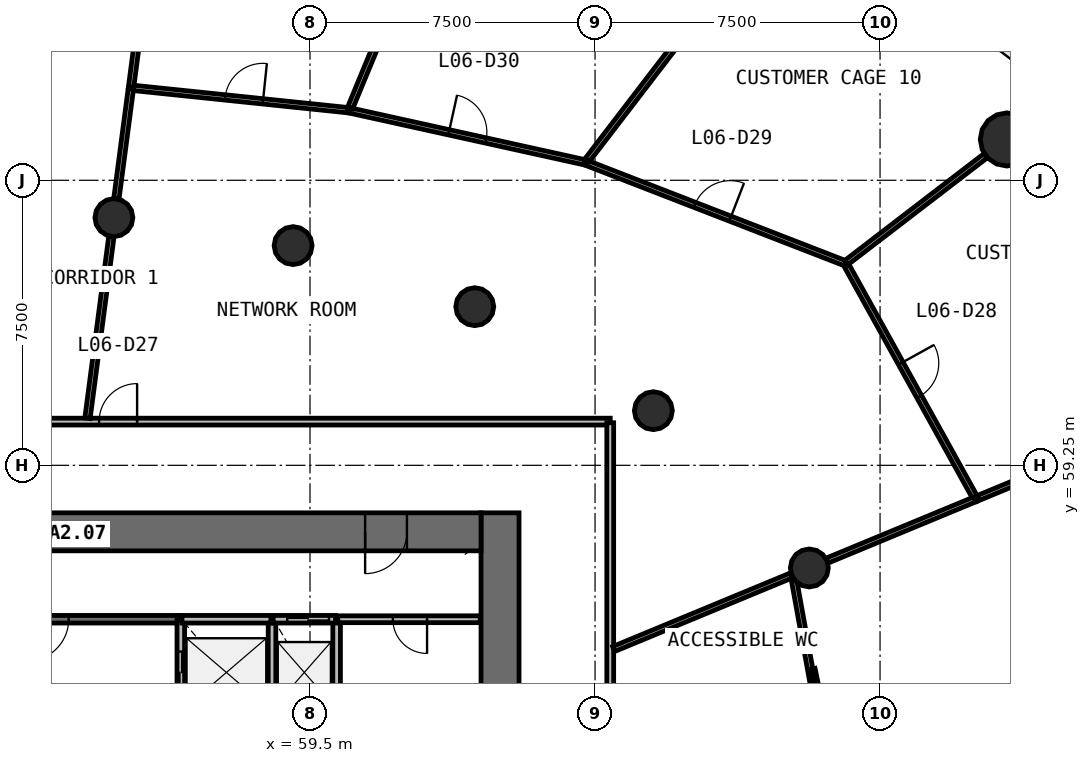
"""IFC4 building model, lengths in metres.
Left out: names, types, materials, properties, quantities, classifications, styles, units other than length and angle.
Written with IfcOpenShell. Run it as: python <this file> out.ifc"""

import sys

from ifc_helpers import new_model, si_unit, direction, frame, frame_2d, origin, origin_2d, place, context, subcontext, project, spatial, rectangle, circle, extrude, source, transform, mapped, element, fill, save


model = new_model("IFC4")
c1 = context("Model", 3, precision=1e-05, world=origin(), true_north=direction((0.0, 1.0)))
c2 = subcontext(c1, "Body", "Model", "MODEL_VIEW")
j1 = project(units=[si_unit("LENGTHUNIT", "METRE"), si_unit("PLANEANGLEUNIT", "RADIAN")], contexts=[c1])
p1 = place(None, origin())
s1 = spatial("IfcSite", under=j1, at=p1, CompositionType="ELEMENT")
p2 = place(p1, origin())
s2 = spatial("IfcBuilding", under=s1, at=p2, CompositionType="ELEMENT")
p3 = place(p2, frame((0.0, 0.0, 27.0)))
s3 = spatial("IfcBuildingStorey", under=s2, at=p3, CompositionType="ELEMENT", Elevation=27.0)
p4 = place(p3, frame((64.5, 38.0, 0.0), z_axis=(0.0, 0.0, 1.0), x_axis=(0.0, 1.0, 0.0)))
e1 = element("IfcWall", 1, at=p4, inside=s3, PredefinedType="SHEAR", context=c2, shape_type="SweptSolid", body=[
    extrude(rectangle(XDim=20.0, YDim=1.0, at=frame_2d((10.0, 0.0))), origin(), (0.0, 0.0, 1.0), 4.4),
])
p5 = place(p4, frame((9.1, 0.0, 0.0)))
e2 = element("IfcOpeningElement", 2, at=p5, cuts=e1, PredefinedType="OPENING", context=c2, shape_type="SweptSolid", body=[
    extrude(rectangle(XDim=1.8, YDim=2.1, at=frame_2d((0.9, 1.05))), frame((0.0, 0.51, 0.0), z_axis=(0.0, -1.0, 0.0), x_axis=(1.0, 0.0, 0.0)), (0.0, 0.0, 1.0), 1.02),
])
p6 = place(p3, frame((64.0, 57.5, 0.0), z_axis=(0.0, 0.0, 1.0), x_axis=(-1.0, 0.0, 0.0)))
e3 = element("IfcWall", 3, at=p6, inside=s3, PredefinedType="SHEAR", context=c2, shape_type="SweptSolid", body=[
    extrude(rectangle(XDim=24.0, YDim=1.0, at=frame_2d((12.0, 0.0))), origin(), (0.0, 0.0, 1.0), 4.4),
])
p7 = place(p6, frame((21.45, 0.0, 0.0)))
e4 = element("IfcOpeningElement", 4, at=p7, cuts=e3, PredefinedType="OPENING", context=c2, shape_type="SweptSolid", body=[
    extrude(rectangle(XDim=1.1, YDim=2.1, at=frame_2d((0.55, 1.05))), frame((0.0, 0.51, 0.0), z_axis=(0.0, -1.0, 0.0), x_axis=(1.0, 0.0, 0.0)), (0.0, 0.0, 1.0), 1.02),
])
p8 = place(p6, frame((1.95, 0.0, 0.0)))
e5 = element("IfcOpeningElement", 5, at=p8, cuts=e3, PredefinedType="OPENING", context=c2, shape_type="SweptSolid", body=[
    extrude(rectangle(XDim=1.1, YDim=2.1, at=frame_2d((0.55, 1.05))), frame((0.0, 0.51, 0.0), z_axis=(0.0, -1.0, 0.0), x_axis=(1.0, 0.0, 0.0)), (0.0, 0.0, 1.0), 1.02),
])
m1 = source(origin(), c2, "Body", "SweptSolid", [
    extrude(circle(Radius=0.7, at=origin_2d()), origin(), (0.0, 0.0, 1.0), 4.4),
])
p9 = place(p3, frame((77.836, 67.824, 0.0), z_axis=(0.0, 0.0, 1.0), x_axis=(1.0, 0.0, 0.0)))
e6 = element("IfcColumn", 6, at=p9, inside=s3, PredefinedType="COLUMN", context=c2, shape_type="MappedRepresentation", body=[
    mapped(m1, transform((0.0, 0.0, 0.0), scale=1.0)),
])
m2 = source(origin(), c2, "Body", "SweptSolid", [
    extrude(circle(Radius=0.5, at=origin_2d()), origin(), (0.0, 0.0, 1.0), 4.4),
])
for number, where, z_axis, x_axis in (
    (7, (72.639, 56.549, 0.0), (0.0, 0.0, 1.0), (1.0, 0.0, 0.0)),
    (8, (68.535, 60.688, 0.0), (0.0, 0.0, 1.0), (1.0, 0.0, 0.0)),
    (9, (63.835, 63.424, 0.0), (0.0, 0.0, 1.0), (1.0, 0.0, 0.0)),
    (10, (59.055, 65.031, 0.0), (0.0, 0.0, 1.0), (1.0, 0.0, 0.0)),
    (11, (54.339, 65.767, 0.0), (0.0, 0.0, 1.0), (1.0, 0.0, 0.0)),
):
    element("IfcColumn", number, at=place(p3, frame(where, z_axis=z_axis, x_axis=x_axis)), inside=s3, PredefinedType="COLUMN", context=c2, shape_type="MappedRepresentation", body=[
        mapped(m2, transform((0.0, 0.0, 0.0), scale=1.0)),
    ])
p10 = place(p3, frame((56.1, 55.2, 0.0), z_axis=(0.0, 0.0, 1.0), x_axis=(-1.0, 0.0, 0.0)))
e12 = element("IfcWall", 12, at=p10, inside=s3, PredefinedType="SOLIDWALL", context=c2, shape_type="SweptSolid", body=[
    extrude(rectangle(XDim=5.67, YDim=0.2, at=frame_2d((2.835, 0.0))), origin(), (0.0, 0.0, 1.0), 3.95),
])
p11 = place(p10, frame((2.95, 0.0, 0.0)))
e13 = element("IfcOpeningElement", 13, at=p11, cuts=e12, PredefinedType="OPENING", context=c2, shape_type="SweptSolid", body=[
    extrude(rectangle(XDim=1.1, YDim=2.1, at=frame_2d((0.55, 1.05))), frame((0.0, 0.11, 0.0), z_axis=(0.0, -1.0, 0.0), x_axis=(1.0, 0.0, 0.0)), (0.0, 0.0, 1.0), 0.22),
])
p12 = place(p3, frame((56.1, 55.17, 0.0), z_axis=(0.0, 0.0, 1.0), x_axis=(0.0, -1.0, 0.0)))
e14 = element("IfcWall", 14, at=p12, inside=s3, PredefinedType="SOLIDWALL", context=c2, shape_type="SweptSolid", body=[
    extrude(rectangle(XDim=2.77, YDim=0.2, at=frame_2d((1.385, 0.0))), origin(), (0.0, 0.0, 1.0), 3.95),
])
p13 = place(p12, frame((0.82, 0.0, 0.0)))
e15 = element("IfcOpeningElement", 15, at=p13, cuts=e14, PredefinedType="OPENING", context=c2, shape_type="SweptSolid", body=[
    extrude(rectangle(XDim=1.1, YDim=2.1, at=frame_2d((0.55, 1.05))), frame((0.0, 0.11, 0.0), z_axis=(0.0, -1.0, 0.0), x_axis=(1.0, 0.0, 0.0)), (0.0, 0.0, 1.0), 0.22),
])
for number, where, z_axis, x_axis in (
    (16, (58.5, 52.4, 0.0), (0.0, 0.0, 1.0), (0.0, 1.0, 0.0)),
    (17, (60.2, 52.4, 0.0), (0.0, 0.0, 1.0), (0.0, 1.0, 0.0)),
):
    element("IfcWall", number, at=place(p3, frame(where, z_axis=z_axis, x_axis=x_axis)), inside=s3, PredefinedType="SOLIDWALL", context=c2, shape_type="SweptSolid", body=[
        extrude(rectangle(XDim=2.8, YDim=0.2, at=frame_2d((1.4, 0.0))), origin(), (0.0, 0.0, 1.0), 3.95),
    ])
p14 = place(p3, frame((58.47, 55.2, 0.0), z_axis=(0.0, 0.0, 1.0), x_axis=(-1.0, 0.0, 0.0)))
e18 = element("IfcWall", 18, at=p14, inside=s3, PredefinedType="SOLIDWALL", context=c2, shape_type="SweptSolid", body=[
    extrude(rectangle(XDim=2.34, YDim=0.2, at=frame_2d((1.17, 0.0))), origin(), (0.0, 0.0, 1.0), 3.95),
])
p15 = place(p3, frame((60.17, 55.2, 0.0), z_axis=(0.0, 0.0, 1.0), x_axis=(-1.0, 0.0, 0.0)))
e19 = element("IfcWall", 19, at=p15, inside=s3, PredefinedType="SOLIDWALL", context=c2, shape_type="SweptSolid", body=[
    extrude(rectangle(XDim=1.64, YDim=0.2, at=frame_2d((0.82, 0.0))), origin(), (0.0, 0.0, 1.0), 3.95),
])
p16 = place(p15, frame((0.17, 0.0, 0.0)))
e20 = element("IfcOpeningElement", 20, at=p16, cuts=e19, PredefinedType="OPENING", context=c2, shape_type="SweptSolid", body=[
    extrude(rectangle(XDim=1.1, YDim=2.1, at=frame_2d((0.55, 1.05))), frame((0.0, 0.11, 0.0), z_axis=(0.0, -1.0, 0.0), x_axis=(1.0, 0.0, 0.0)), (0.0, 0.0, 1.0), 0.22),
])
p17 = place(p3, frame((36.6, 60.4, 0.0), z_axis=(0.0, 0.0, 1.0), x_axis=(1.0, 0.0, 0.0)))
e21 = element("IfcWall", 21, at=p17, inside=s3, PredefinedType="PARTITIONING", context=c2, shape_type="SweptSolid", body=[
    extrude(rectangle(XDim=30.8, YDim=0.18, at=frame_2d((15.4, 0.0))), origin(), (0.0, 0.0, 1.0), 3.05),
])
p18 = place(p17, frame((17.35, 0.0, 0.0)))
e22 = element("IfcOpeningElement", 22, at=p18, cuts=e21, PredefinedType="OPENING", context=c2, shape_type="SweptSolid", body=[
    extrude(rectangle(XDim=1.0, YDim=2.1, at=frame_2d((0.5, 1.05))), frame((0.0, 0.1, 0.0), z_axis=(0.0, -1.0, 0.0), x_axis=(1.0, 0.0, 0.0)), (0.0, 0.0, 1.0), 0.2),
])
p19 = place(p17, frame((14.95, 0.0, 0.0)))
e23 = element("IfcOpeningElement", 23, at=p19, cuts=e21, PredefinedType="OPENING", context=c2, shape_type="SweptSolid", body=[
    extrude(rectangle(XDim=1.0, YDim=2.1, at=frame_2d((0.5, 1.05))), frame((0.0, 0.1, 0.0), z_axis=(0.0, -1.0, 0.0), x_axis=(1.0, 0.0, 0.0)), (0.0, 0.0, 1.0), 0.2),
])
p20 = place(p17, frame((12.55, 0.0, 0.0)))
e24 = element("IfcOpeningElement", 24, at=p20, cuts=e21, PredefinedType="OPENING", context=c2, shape_type="SweptSolid", body=[
    extrude(rectangle(XDim=1.0, YDim=2.1, at=frame_2d((0.5, 1.05))), frame((0.0, 0.1, 0.0), z_axis=(0.0, -1.0, 0.0), x_axis=(1.0, 0.0, 0.0)), (0.0, 0.0, 1.0), 0.2),
])
p21 = place(p3, frame((67.4, 60.37, 0.0), z_axis=(0.0, 0.0, 1.0), x_axis=(0.0, -1.0, 0.0)))
e25 = element("IfcWall", 25, at=p21, inside=s3, PredefinedType="PARTITIONING", context=c2, shape_type="SweptSolid", body=[
    extrude(rectangle(XDim=23.583, YDim=0.18, at=frame_2d((11.791, 0.0))), origin(), (0.0, 0.0, 1.0), 3.05),
])
p22 = place(p21, frame((11.833, 0.0, 0.0)))
e26 = element("IfcOpeningElement", 26, at=p22, cuts=e25, PredefinedType="OPENING", context=c2, shape_type="SweptSolid", body=[
    extrude(rectangle(XDim=0.9, YDim=2.1, at=frame_2d((0.45, 1.05))), frame((0.0, 0.1, 0.0), z_axis=(0.0, -1.0, 0.0), x_axis=(1.0, 0.0, 0.0)), (0.0, 0.0, 1.0), 0.2),
])
p23 = place(p21, frame((10.433, 0.0, 0.0)))
e27 = element("IfcOpeningElement", 27, at=p23, cuts=e25, PredefinedType="OPENING", context=c2, shape_type="SweptSolid", body=[
    extrude(rectangle(XDim=0.9, YDim=2.1, at=frame_2d((0.45, 1.05))), frame((0.0, 0.1, 0.0), z_axis=(0.0, -1.0, 0.0), x_axis=(1.0, 0.0, 0.0)), (0.0, 0.0, 1.0), 0.2),
])
p24 = place(p21, frame((7.833, 0.0, 0.0)))
e28 = element("IfcOpeningElement", 28, at=p24, cuts=e25, PredefinedType="OPENING", context=c2, shape_type="SweptSolid", body=[
    extrude(rectangle(XDim=0.9, YDim=2.1, at=frame_2d((0.45, 1.05))), frame((0.0, 0.1, 0.0), z_axis=(0.0, -1.0, 0.0), x_axis=(1.0, 0.0, 0.0)), (0.0, 0.0, 1.0), 0.2),
])
p25 = place(p21, frame((19.133, 0.0, 0.0)))
e29 = element("IfcOpeningElement", 29, at=p25, cuts=e25, PredefinedType="OPENING", context=c2, shape_type="SweptSolid", body=[
    extrude(rectangle(XDim=1.0, YDim=2.1, at=frame_2d((0.5, 1.05))), frame((0.0, 0.1, 0.0), z_axis=(0.0, -1.0, 0.0), x_axis=(1.0, 0.0, 0.0)), (0.0, 0.0, 1.0), 0.2),
])
p26 = place(p21, frame((14.732, 0.0, 0.0)))
e30 = element("IfcOpeningElement", 30, at=p26, cuts=e25, PredefinedType="OPENING", context=c2, shape_type="SweptSolid", body=[
    extrude(rectangle(XDim=1.0, YDim=2.1, at=frame_2d((0.5, 1.05))), frame((0.0, 0.1, 0.0), z_axis=(0.0, -1.0, 0.0), x_axis=(1.0, 0.0, 0.0)), (0.0, 0.0, 1.0), 0.2),
])
p27 = place(p3, frame((63.98, 55.2, 0.0), z_axis=(0.0, 0.0, 1.0), x_axis=(-1.0, 0.0, 0.0)))
e31 = element("IfcWall", 31, at=p27, inside=s3, PredefinedType="PARTITIONING", context=c2, shape_type="SweptSolid", body=[
    extrude(rectangle(XDim=3.75, YDim=0.18, at=frame_2d((1.875, 0.0))), origin(), (0.0, 0.0, 1.0), 3.95),
])
p28 = place(p27, frame((1.4, 0.0, 0.0)))
e32 = element("IfcOpeningElement", 32, at=p28, cuts=e31, PredefinedType="OPENING", context=c2, shape_type="SweptSolid", body=[
    extrude(rectangle(XDim=0.9, YDim=2.1, at=frame_2d((0.45, 1.05))), frame((0.0, 0.1, 0.0), z_axis=(0.0, -1.0, 0.0), x_axis=(1.0, 0.0, 0.0)), (0.0, 0.0, 1.0), 0.2),
])
p29 = place(p3, frame((66.747, 67.219, 0.0), z_axis=(0.0, 0.0, 1.0), x_axis=(0.932284149261, -0.361726782305, 0.0)))
e33 = element("IfcWall", 33, at=p29, inside=s3, PredefinedType="PARTITIONING", context=c2, shape_type="SweptSolid", body=[
    extrude(rectangle(XDim=7.337, YDim=0.14, at=frame_2d((3.668, 0.0))), origin(), (0.0, 0.0, 1.0), 3.05),
])
p30 = place(p29, frame((3.087, 0.0, 0.0)))
e34 = element("IfcOpeningElement", 34, at=p30, cuts=e33, PredefinedType="OPENING", context=c2, shape_type="SweptSolid", body=[
    extrude(rectangle(XDim=1.0, YDim=2.1, at=frame_2d((0.5, 1.05))), frame((0.0, 0.08, 0.0), z_axis=(0.0, -1.0, 0.0), x_axis=(1.0, 0.0, 0.0)), (0.0, 0.0, 1.0), 0.16),
])
p31 = place(p3, frame((77.021, 58.364, 0.0), z_axis=(0.0, 0.0, 1.0), x_axis=(0.923882643146, 0.382675922542, 0.0)))
e35 = element("IfcWall", 35, at=p31, inside=s3, PredefinedType="PARTITIONING", context=c2, shape_type="SweptSolid", body=[
    extrude(rectangle(XDim=7.118, YDim=0.14, at=frame_2d((3.559, 0.0))), origin(), (0.0, 0.0, 1.0), 3.05),
])
p32 = place(p3, frame((73.602, 64.539, 0.0), z_axis=(0.0, 0.0, 1.0), x_axis=(0.484486331766, -0.874798830779, 0.0)))
e36 = element("IfcWall", 36, at=p32, inside=s3, PredefinedType="PARTITIONING", context=c2, shape_type="SweptSolid", body=[
    extrude(rectangle(XDim=7.028, YDim=0.14, at=frame_2d((3.514, 0.0))), origin(), (0.0, 0.0, 1.0), 3.05),
])
p33 = place(p32, frame((2.978, 0.0, 0.0)))
e37 = element("IfcOpeningElement", 37, at=p33, cuts=e36, PredefinedType="OPENING", context=c2, shape_type="SweptSolid", body=[
    extrude(rectangle(XDim=1.0, YDim=2.1, at=frame_2d((0.5, 1.05))), frame((0.0, 0.08, 0.0), z_axis=(0.0, -1.0, 0.0), x_axis=(1.0, 0.0, 0.0)), (0.0, 0.0, 1.0), 0.16),
])
p34 = place(p3, frame((60.529, 68.591, 0.0), z_axis=(0.0, 0.0, 1.0), x_axis=(0.976496953748, -0.21553120266, 0.0)))
e38 = element("IfcWall", 38, at=p34, inside=s3, PredefinedType="PARTITIONING", context=c2, shape_type="SweptSolid", body=[
    extrude(rectangle(XDim=6.338, YDim=0.14, at=frame_2d((3.169, 0.0))), origin(), (0.0, 0.0, 1.0), 3.05),
])
p35 = place(p34, frame((2.688, 0.0, 0.0)))
e39 = element("IfcOpeningElement", 39, at=p35, cuts=e38, PredefinedType="OPENING", context=c2, shape_type="SweptSolid", body=[
    extrude(rectangle(XDim=1.0, YDim=2.1, at=frame_2d((0.5, 1.05))), frame((0.0, 0.08, 0.0), z_axis=(0.0, -1.0, 0.0), x_axis=(1.0, 0.0, 0.0)), (0.0, 0.0, 1.0), 0.16),
])
p36 = place(p3, frame((54.789, 69.187, 0.0), z_axis=(0.0, 0.0, 1.0), x_axis=(0.130536559076, 0.991443496496, 0.0)))
e40 = element("IfcWall", 40, at=p36, inside=s3, PredefinedType="PARTITIONING", context=c2, shape_type="SweptSolid", body=[
    extrude(rectangle(XDim=5.927, YDim=0.14, at=frame_2d((2.963, 0.0))), origin(), (0.0, 0.0, 1.0), 3.05),
])
p37 = place(p3, frame((60.556, 68.657, 0.0), z_axis=(0.0, 0.0, 1.0), x_axis=(0.382663574121, 0.923887757815, 0.0)))
e41 = element("IfcWall", 41, at=p37, inside=s3, PredefinedType="PARTITIONING", context=c2, shape_type="SweptSolid", body=[
    extrude(rectangle(XDim=5.74, YDim=0.14, at=frame_2d((2.87, 0.0))), origin(), (0.0, 0.0, 1.0), 3.05),
])
p38 = place(p3, frame((54.859, 69.18, 0.0), z_axis=(0.0, 0.0, 1.0), x_axis=(0.994651908079, -0.103283985953, 0.0)))
e42 = element("IfcWall", 42, at=p38, inside=s3, PredefinedType="PARTITIONING", context=c2, shape_type="SweptSolid", body=[
    extrude(rectangle(XDim=5.671, YDim=0.14, at=frame_2d((2.835, 0.0))), origin(), (0.0, 0.0, 1.0), 3.05),
])
p39 = place(p38, frame((2.421, 0.0, 0.0)))
e43 = element("IfcOpeningElement", 43, at=p39, cuts=e42, PredefinedType="OPENING", context=c2, shape_type="SweptSolid", body=[
    extrude(rectangle(XDim=1.0, YDim=2.1, at=frame_2d((0.5, 1.05))), frame((0.0, 0.08, 0.0), z_axis=(0.0, -1.0, 0.0), x_axis=(1.0, 0.0, 0.0)), (0.0, 0.0, 1.0), 0.16),
])
p40 = place(p3, frame((73.215, 50.823, 0.0), z_axis=(0.0, 0.0, 1.0), x_axis=(-0.178121903576, 0.984008428555, 0.0)))
e44 = element("IfcWall", 44, at=p40, inside=s3, PredefinedType="PARTITIONING", context=c2, shape_type="SweptSolid", body=[
    extrude(rectangle(XDim=5.515, YDim=0.14, at=frame_2d((2.758, 0.0))), origin(), (0.0, 0.0, 1.0), 3.05),
])
p41 = place(p3, frame((66.792, 67.277, 0.0), z_axis=(0.0, 0.0, 1.0), x_axis=(0.608764273517, 0.793351157615, 0.0)))
e45 = element("IfcWall", 45, at=p41, inside=s3, PredefinedType="PARTITIONING", context=c2, shape_type="SweptSolid", body=[
    extrude(rectangle(XDim=5.375, YDim=0.14, at=frame_2d((2.688, 0.0))), origin(), (0.0, 0.0, 1.0), 3.05),
])
p42 = place(p3, frame((67.49, 54.416, 0.0), z_axis=(0.0, 0.0, 1.0), x_axis=(0.923890025086, 0.382658100067, 0.0)))
e46 = element("IfcWall", 46, at=p42, inside=s3, PredefinedType="PARTITIONING", context=c2, shape_type="SweptSolid", body=[
    extrude(rectangle(XDim=5.068, YDim=0.14, at=frame_2d((2.534, 0.0))), origin(), (0.0, 0.0, 1.0), 3.05),
])
p43 = place(p3, frame((53.644, 60.49, 0.0), z_axis=(0.0, 0.0, 1.0), x_axis=(0.130523979823, 0.991445152639, 0.0)))
e47 = element("IfcWall", 47, at=p43, inside=s3, PredefinedType="PARTITIONING", context=c2, shape_type="SweptSolid", body=[
    extrude(rectangle(XDim=4.818, YDim=0.14, at=frame_2d((2.409, 0.0))), origin(), (0.0, 0.0, 1.0), 3.05),
])
p44 = place(p3, frame((73.611, 64.583, 0.0), z_axis=(0.0, 0.0, 1.0), x_axis=(0.793369862055, 0.608739896821, 0.0)))
e48 = element("IfcWall", 48, at=p44, inside=s3, PredefinedType="PARTITIONING", context=c2, shape_type="SweptSolid", body=[
    extrude(rectangle(XDim=4.62, YDim=0.14, at=frame_2d((2.31, 0.0))), origin(), (0.0, 0.0, 1.0), 3.05),
])
p45 = place(p3, frame((73.106, 56.742, 0.0), z_axis=(0.0, 0.0, 1.0), x_axis=(0.923866219986, 0.382715570063, 0.0)))
e49 = element("IfcWall", 49, at=p45, inside=s3, PredefinedType="PARTITIONING", context=c2, shape_type="SweptSolid", body=[
    extrude(rectangle(XDim=4.208, YDim=0.14, at=frame_2d((2.104, 0.0))), origin(), (0.0, 0.0, 1.0), 3.05),
])
p46 = place(p3, frame((54.405, 66.267, 0.0), z_axis=(0.0, 0.0, 1.0), x_axis=(0.130484843212, 0.991450304197, 0.0)))
e50 = element("IfcWall", 50, at=p46, inside=s3, PredefinedType="PARTITIONING", context=c2, shape_type="SweptSolid", body=[
    extrude(rectangle(XDim=2.915, YDim=0.14, at=frame_2d((1.458, 0.0))), origin(), (0.0, 0.0, 1.0), 3.05),
])
p47 = place(p3, frame((72.99, 52.654, 0.0), z_axis=(0.0, 0.0, 1.0), x_axis=(-0.205214844297, 0.978716949726, 0.0)))
e51 = element("IfcWall", 51, at=p47, inside=s3, PredefinedType="PARTITIONING", context=c2, shape_type="SweptSolid", body=[
    extrude(rectangle(XDim=1.268, YDim=0.12, at=frame_2d((0.634, 0.0))), origin(), (0.0, 0.0, 1.0), 3.05),
])
m3 = source(origin(), c2, "Body", "SweptSolid", [
    extrude(rectangle(XDim=1.1, YDim=2.1, at=frame_2d((0.55, 1.05))), frame((0.0, 0.025, 0.0), z_axis=(0.0, -1.0, 0.0), x_axis=(1.0, 0.0, 0.0)), (0.0, 0.0, 1.0), 0.05),
])
p48 = place(p13, origin())
e52 = element("IfcDoor", 52, at=p48, inside=s3, OperationType="DOUBLE_DOOR_SLIDING", PredefinedType="USERDEFINED", context=c2, shape_type="MappedRepresentation", body=[
    mapped(m3, transform((0.0, 0.0, 0.0), scale=1.0)),
])
fill(e15, e52)
p49 = place(p16, origin())
e53 = element("IfcDoor", 53, at=p49, inside=s3, OperationType="DOUBLE_DOOR_SLIDING", PredefinedType="USERDEFINED", context=c2, shape_type="MappedRepresentation", body=[
    mapped(m3, transform((0.0, 0.0, 0.0), scale=1.0)),
])
fill(e20, e53)
m4 = source(origin(), c2, "Body", "SweptSolid", [
    extrude(rectangle(XDim=1.1, YDim=2.1, at=frame_2d((0.55, 1.05))), frame((0.0, 0.025, 0.0), z_axis=(0.0, -1.0, 0.0), x_axis=(1.0, 0.0, 0.0)), (0.0, 0.0, 1.0), 0.05),
])
p50 = place(p11, origin())
e54 = element("IfcDoor", 54, at=p50, inside=s3, OperationType="SINGLE_SWING_RIGHT", PredefinedType="DOOR", context=c2, shape_type="MappedRepresentation", body=[
    mapped(m4, transform((0.0, 0.0, 0.0), scale=1.0)),
])
fill(e13, e54)
m5 = source(origin(), c2, "Body", "SweptSolid", [
    extrude(rectangle(XDim=1.1, YDim=2.1, at=frame_2d((0.55, 1.05))), frame((0.0, 0.025, 0.0), z_axis=(0.0, -1.0, 0.0), x_axis=(1.0, 0.0, 0.0)), (0.0, 0.0, 1.0), 0.05),
])
p51 = place(p8, origin())
e55 = element("IfcDoor", 55, at=p51, inside=s3, OperationType="SINGLE_SWING_RIGHT", PredefinedType="DOOR", context=c2, shape_type="MappedRepresentation", body=[
    mapped(m5, transform((0.0, 0.0, 0.0), scale=1.0)),
])
fill(e5, e55)
m6 = source(origin(), c2, "Body", "SweptSolid", [
    extrude(rectangle(XDim=1.0, YDim=2.1, at=frame_2d((0.5, 1.05))), frame((0.0, 0.025, 0.0), z_axis=(0.0, -1.0, 0.0), x_axis=(1.0, 0.0, 0.0)), (0.0, 0.0, 1.0), 0.05),
])
p52 = place(p18, origin())
e56 = element("IfcDoor", 56, at=p52, inside=s3, OperationType="SINGLE_SWING_RIGHT", PredefinedType="DOOR", context=c2, shape_type="MappedRepresentation", body=[
    mapped(m6, transform((0.0, 0.0, 0.0), scale=1.0)),
])
fill(e22, e56)
p53 = place(p33, origin())
e57 = element("IfcDoor", 57, at=p53, inside=s3, OperationType="SINGLE_SWING_LEFT", PredefinedType="DOOR", context=c2, shape_type="MappedRepresentation", body=[
    mapped(m6, transform((0.0, 0.0, 0.0), scale=1.0)),
])
fill(e37, e57)
p54 = place(p30, origin())
e58 = element("IfcDoor", 58, at=p54, inside=s3, OperationType="SINGLE_SWING_RIGHT", PredefinedType="DOOR", context=c2, shape_type="MappedRepresentation", body=[
    mapped(m6, transform((0.0, 0.0, 0.0), scale=1.0)),
])
fill(e34, e58)
p55 = place(p35, origin())
e59 = element("IfcDoor", 59, at=p55, inside=s3, OperationType="SINGLE_SWING_LEFT", PredefinedType="DOOR", context=c2, shape_type="MappedRepresentation", body=[
    mapped(m6, transform((0.0, 0.0, 0.0), scale=1.0)),
])
fill(e39, e59)
p56 = place(p39, origin())
e60 = element("IfcDoor", 60, at=p56, inside=s3, OperationType="SINGLE_SWING_RIGHT", PredefinedType="DOOR", context=c2, shape_type="MappedRepresentation", body=[
    mapped(m6, transform((0.0, 0.0, 0.0), scale=1.0)),
])
fill(e43, e60)
m7 = source(origin(), c2, "Body", "SweptSolid", [
    extrude(rectangle(XDim=0.9, YDim=2.1, at=frame_2d((0.45, 1.05))), frame((0.0, 0.025, 0.0), z_axis=(0.0, -1.0, 0.0), x_axis=(1.0, 0.0, 0.0)), (0.0, 0.0, 1.0), 0.05),
])
p57 = place(p28, origin())
e61 = element("IfcDoor", 61, at=p57, inside=s3, OperationType="SINGLE_SWING_LEFT", PredefinedType="DOOR", context=c2, shape_type="MappedRepresentation", body=[
    mapped(m7, transform((0.0, 0.0, 0.0), scale=1.0)),
])
fill(e32, e61)
save(model, sys.argv[1])
